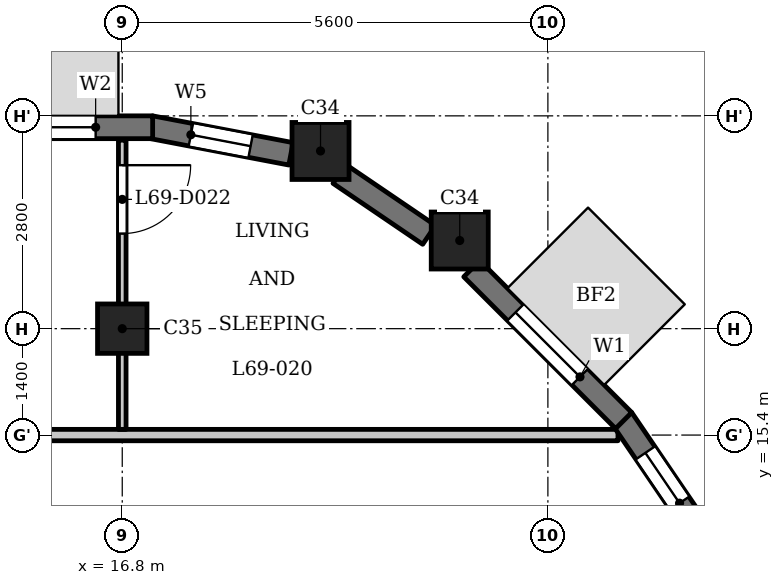
"""IFC4 building model, lengths in metres.
Left out: names, types, materials, properties, quantities, classifications, styles, units other than length and angle.
Written with IfcOpenShell. Run it as: python <this file> out.ifc"""

import sys

from ifc_helpers import new_model, si_unit, direction, frame, frame_2d, origin, origin_2d, place, context, subcontext, project, spatial, rectangle, extrude, element, fill, save


model = new_model("IFC4")
c1 = context("Model", 3, precision=1e-05, world=origin(), true_north=direction((0.0, 1.0)))
c2 = subcontext(c1, "Body", "Model", "MODEL_VIEW")
j1 = project(units=[si_unit("LENGTHUNIT", "METRE"), si_unit("PLANEANGLEUNIT", "RADIAN")], contexts=[c1])
p1 = place(None, origin())
s1 = spatial("IfcSite", under=j1, at=p1, CompositionType="ELEMENT")
p2 = place(p1, origin())
s2 = spatial("IfcBuilding", under=s1, at=p2, CompositionType="ELEMENT")
p3 = place(p2, frame((0.0, 0.0, 266.2)))
s3 = spatial("IfcBuildingStorey", under=s2, at=p3, CompositionType="ELEMENT", Elevation=266.2)
for number, where, z_axis, x_axis in (
    (1, (21.24, 17.96, 0.0), (0.0, 0.0, 1.0), (1.0, 0.0, 0.0)),
    (2, (19.409, 19.138, 0.0), (0.0, 0.0, 1.0), (1.0, 0.0, 0.0)),
):
    element("IfcColumn", number, at=place(p3, frame(where, z_axis=z_axis, x_axis=x_axis)), inside=s3, PredefinedType="COLUMN", context=c2, shape_type="SweptSolid", body=[
        extrude(rectangle(XDim=0.75, YDim=0.75, at=origin_2d()), origin(), (0.0, 0.0, 1.0), 3.5),
    ])
p4 = place(p3, frame((16.8, 16.8, 0.0), z_axis=(0.0, 0.0, 1.0), x_axis=(1.0, 0.0, 0.0)))
e3 = element("IfcColumn", 3, at=p4, inside=s3, PredefinedType="COLUMN", context=c2, shape_type="SweptSolid", body=[
    extrude(rectangle(XDim=0.65, YDim=0.65, at=origin_2d()), origin(), (0.0, 0.0, 1.0), 3.5),
])
p5 = place(p3, frame((24.436, 14.057, 0.0), z_axis=(0.0, 0.0, 1.0), x_axis=(-0.562075713892, 0.827085782645, 0.0)))
e4 = element("IfcWall", 4, at=p5, inside=s3, PredefinedType="SOLIDWALL", context=c2, shape_type="SweptSolid", body=[
    extrude(rectangle(XDim=1.881, YDim=0.3, at=frame_2d((0.94, 0.0))), origin(), (0.0, 0.0, 1.0), 2.55),
])
p6 = place(p5, frame((0.541, 0.0, 0.6)))
e5 = element("IfcOpeningElement", 5, at=p6, cuts=e4, PredefinedType="OPENING", context=c2, shape_type="SweptSolid", body=[
    extrude(rectangle(XDim=0.8, YDim=1.55, at=frame_2d((0.4, 0.775))), frame((0.0, 0.16, 0.0), z_axis=(0.0, -1.0, 0.0), x_axis=(1.0, 0.0, 0.0)), (0.0, 0.0, 1.0), 0.32),
])
p7 = place(p3, frame((23.397, 15.591, 0.0), z_axis=(0.0, 0.0, 1.0), x_axis=(-0.707106781187, 0.707106781187, 0.0)))
e6 = element("IfcWall", 6, at=p7, inside=s3, PredefinedType="SOLIDWALL", context=c2, shape_type="SweptSolid", body=[
    extrude(rectangle(XDim=2.825, YDim=0.3, at=frame_2d((1.413, 0.0))), origin(), (0.0, 0.0, 1.0), 2.55),
])
p8 = place(p7, frame((0.812, 0.0, 0.6)))
e7 = element("IfcOpeningElement", 7, at=p8, cuts=e6, PredefinedType="OPENING", context=c2, shape_type="SweptSolid", body=[
    extrude(rectangle(XDim=1.2, YDim=1.55, at=frame_2d((0.6, 0.775))), frame((0.0, 0.16, 0.0), z_axis=(0.0, -1.0, 0.0), x_axis=(1.0, 0.0, 0.0)), (0.0, 0.0, 1.0), 0.32),
])
p9 = place(p3, frame((20.837, 18.034, 0.0), z_axis=(0.0, 0.0, 1.0), x_axis=(-0.827095130818, 0.562061957952, 0.0)))
e8 = element("IfcWall", 8, at=p9, inside=s3, PredefinedType="SOLIDWALL", context=c2, shape_type="SweptSolid", body=[
    extrude(rectangle(XDim=1.427, YDim=0.3, at=frame_2d((0.713, 0.0))), origin(), (0.0, 0.0, 1.0), 2.55),
])
p10 = place(p3, frame((19.02, 19.1, 0.0), z_axis=(0.0, 0.0, 1.0), x_axis=(-0.982284001233, 0.187398348234, 0.0)))
e9 = element("IfcWall", 9, at=p10, inside=s3, PredefinedType="SOLIDWALL", context=c2, shape_type="SweptSolid", body=[
    extrude(rectangle(XDim=1.881, YDim=0.3, at=frame_2d((0.941, 0.0))), origin(), (0.0, 0.0, 1.0), 2.55),
])
p11 = place(p10, frame((0.541, 0.0, 0.6)))
e10 = element("IfcOpeningElement", 10, at=p11, cuts=e9, PredefinedType="OPENING", context=c2, shape_type="SweptSolid", body=[
    extrude(rectangle(XDim=0.8, YDim=1.55, at=frame_2d((0.4, 0.775))), frame((0.0, 0.16, 0.0), z_axis=(0.0, -1.0, 0.0), x_axis=(1.0, 0.0, 0.0)), (0.0, 0.0, 1.0), 0.32),
])
p12 = place(p3, frame((17.2, 19.45, 0.0), z_axis=(0.0, 0.0, 1.0), x_axis=(-1.0, 0.0, 0.0)))
e11 = element("IfcWall", 11, at=p12, inside=s3, PredefinedType="SOLIDWALL", context=c2, shape_type="SweptSolid", body=[
    extrude(rectangle(XDim=2.825, YDim=0.3, at=frame_2d((1.413, 0.0))), origin(), (0.0, 0.0, 1.0), 2.55),
])
p13 = place(p12, frame((0.75, 0.0, 0.9)))
e12 = element("IfcOpeningElement", 12, at=p13, cuts=e11, PredefinedType="OPENING", context=c2, shape_type="SweptSolid", body=[
    extrude(rectangle(XDim=1.8, YDim=1.25, at=frame_2d((0.9, 0.625))), frame((0.0, 0.16, 0.0), z_axis=(0.0, -1.0, 0.0), x_axis=(1.0, 0.0, 0.0)), (0.0, 0.0, 1.0), 0.32),
])
p14 = place(p3, frame((-23.55, 15.4, 0.0), z_axis=(0.0, 0.0, 1.0), x_axis=(1.0, 0.0, 0.0)))
e13 = element("IfcWall", 13, at=p14, inside=s3, PredefinedType="PARTITIONING", context=c2, shape_type="SweptSolid", body=[
    extrude(rectangle(XDim=46.872, YDim=0.15, at=frame_2d((23.436, 0.0))), origin(), (0.0, 0.0, 1.0), 3.2),
])
p15 = place(p14, frame((8.05, 0.0, 0.0)))
e14 = element("IfcOpeningElement", 14, at=p15, cuts=e13, PredefinedType="OPENING", context=c2, shape_type="SweptSolid", body=[
    extrude(rectangle(XDim=1.0, YDim=2.1, at=frame_2d((0.5, 1.05))), frame((0.0, 0.085, 0.0), z_axis=(0.0, -1.0, 0.0), x_axis=(1.0, 0.0, 0.0)), (0.0, 0.0, 1.0), 0.17),
])
p16 = place(p14, frame((15.05, 0.0, 0.0)))
e15 = element("IfcOpeningElement", 15, at=p16, cuts=e13, PredefinedType="OPENING", context=c2, shape_type="SweptSolid", body=[
    extrude(rectangle(XDim=1.0, YDim=2.1, at=frame_2d((0.5, 1.05))), frame((0.0, 0.085, 0.0), z_axis=(0.0, -1.0, 0.0), x_axis=(1.0, 0.0, 0.0)), (0.0, 0.0, 1.0), 0.17),
])
p17 = place(p14, frame((26.25, 0.0, 0.0)))
e16 = element("IfcOpeningElement", 16, at=p17, cuts=e13, PredefinedType="OPENING", context=c2, shape_type="SweptSolid", body=[
    extrude(rectangle(XDim=1.0, YDim=2.1, at=frame_2d((0.5, 1.05))), frame((0.0, 0.085, 0.0), z_axis=(0.0, -1.0, 0.0), x_axis=(1.0, 0.0, 0.0)), (0.0, 0.0, 1.0), 0.17),
])
p18 = place(p14, frame((38.2, 0.0, 0.0)))
e17 = element("IfcOpeningElement", 17, at=p18, cuts=e13, PredefinedType="OPENING", context=c2, shape_type="SweptSolid", body=[
    extrude(rectangle(XDim=1.0, YDim=2.1, at=frame_2d((0.5, 1.05))), frame((0.0, 0.085, 0.0), z_axis=(0.0, -1.0, 0.0), x_axis=(1.0, 0.0, 0.0)), (0.0, 0.0, 1.0), 0.17),
])
p19 = place(p3, frame((16.8, 15.475, 0.0), z_axis=(0.0, 0.0, 1.0), x_axis=(0.0, 1.0, 0.0)))
e18 = element("IfcWall", 18, at=p19, inside=s3, PredefinedType="PARTITIONING", context=c2, shape_type="SweptSolid", body=[
    extrude(rectangle(XDim=3.805, YDim=0.1, at=frame_2d((1.902, 0.0))), origin(), (0.0, 0.0, 1.0), 3.2),
])
p20 = place(p19, frame((2.576, 0.0, 0.0)))
e19 = element("IfcOpeningElement", 19, at=p20, cuts=e18, PredefinedType="OPENING", context=c2, shape_type="SweptSolid", body=[
    extrude(rectangle(XDim=0.9, YDim=2.1, at=frame_2d((0.45, 1.05))), frame((0.0, 0.06, 0.0), z_axis=(0.0, -1.0, 0.0), x_axis=(1.0, 0.0, 0.0)), (0.0, 0.0, 1.0), 0.12),
])
p21 = place(p20, origin())
e20 = element("IfcDoor", 20, at=p21, inside=s3, OperationType="SINGLE_SWING_RIGHT", PredefinedType="DOOR", context=c2, shape_type="SweptSolid", body=[
    extrude(rectangle(XDim=0.9, YDim=2.1, at=frame_2d((0.45, 1.05))), frame((0.0, 0.025, 0.0), z_axis=(0.0, -1.0, 0.0), x_axis=(1.0, 0.0, 0.0)), (0.0, 0.0, 1.0), 0.05),
])
fill(e19, e20)
p22 = place(p6, origin())
e21 = element("IfcWindow", 21, at=p22, inside=s3, PartitioningType="SINGLE_PANEL", PredefinedType="WINDOW", context=c2, shape_type="SweptSolid", body=[
    extrude(rectangle(XDim=0.8, YDim=1.55, at=frame_2d((0.4, 0.775))), frame((0.0, 0.03, 0.0), z_axis=(0.0, -1.0, 0.0), x_axis=(1.0, 0.0, 0.0)), (0.0, 0.0, 1.0), 0.06),
])
fill(e5, e21)
p23 = place(p8, origin())
e22 = element("IfcWindow", 22, at=p23, inside=s3, PartitioningType="SINGLE_PANEL", PredefinedType="WINDOW", context=c2, shape_type="SweptSolid", body=[
    extrude(rectangle(XDim=1.2, YDim=1.55, at=frame_2d((0.6, 0.775))), frame((0.0, 0.03, 0.0), z_axis=(0.0, -1.0, 0.0), x_axis=(1.0, 0.0, 0.0)), (0.0, 0.0, 1.0), 0.06),
])
fill(e7, e22)
p24 = place(p11, origin())
e23 = element("IfcWindow", 23, at=p24, inside=s3, PartitioningType="SINGLE_PANEL", PredefinedType="WINDOW", context=c2, shape_type="SweptSolid", body=[
    extrude(rectangle(XDim=0.8, YDim=1.55, at=frame_2d((0.4, 0.775))), frame((0.0, 0.03, 0.0), z_axis=(0.0, -1.0, 0.0), x_axis=(1.0, 0.0, 0.0)), (0.0, 0.0, 1.0), 0.06),
])
fill(e10, e23)
p25 = place(p13, origin())
e24 = element("IfcWindow", 24, at=p25, inside=s3, PartitioningType="SINGLE_PANEL", PredefinedType="WINDOW", context=c2, shape_type="SweptSolid", body=[
    extrude(rectangle(XDim=1.8, YDim=1.25, at=frame_2d((0.9, 0.625))), frame((0.0, 0.03, 0.0), z_axis=(0.0, -1.0, 0.0), x_axis=(1.0, 0.0, 0.0)), (0.0, 0.0, 1.0), 0.06),
])
fill(e12, e24)
save(model, sys.argv[1])
